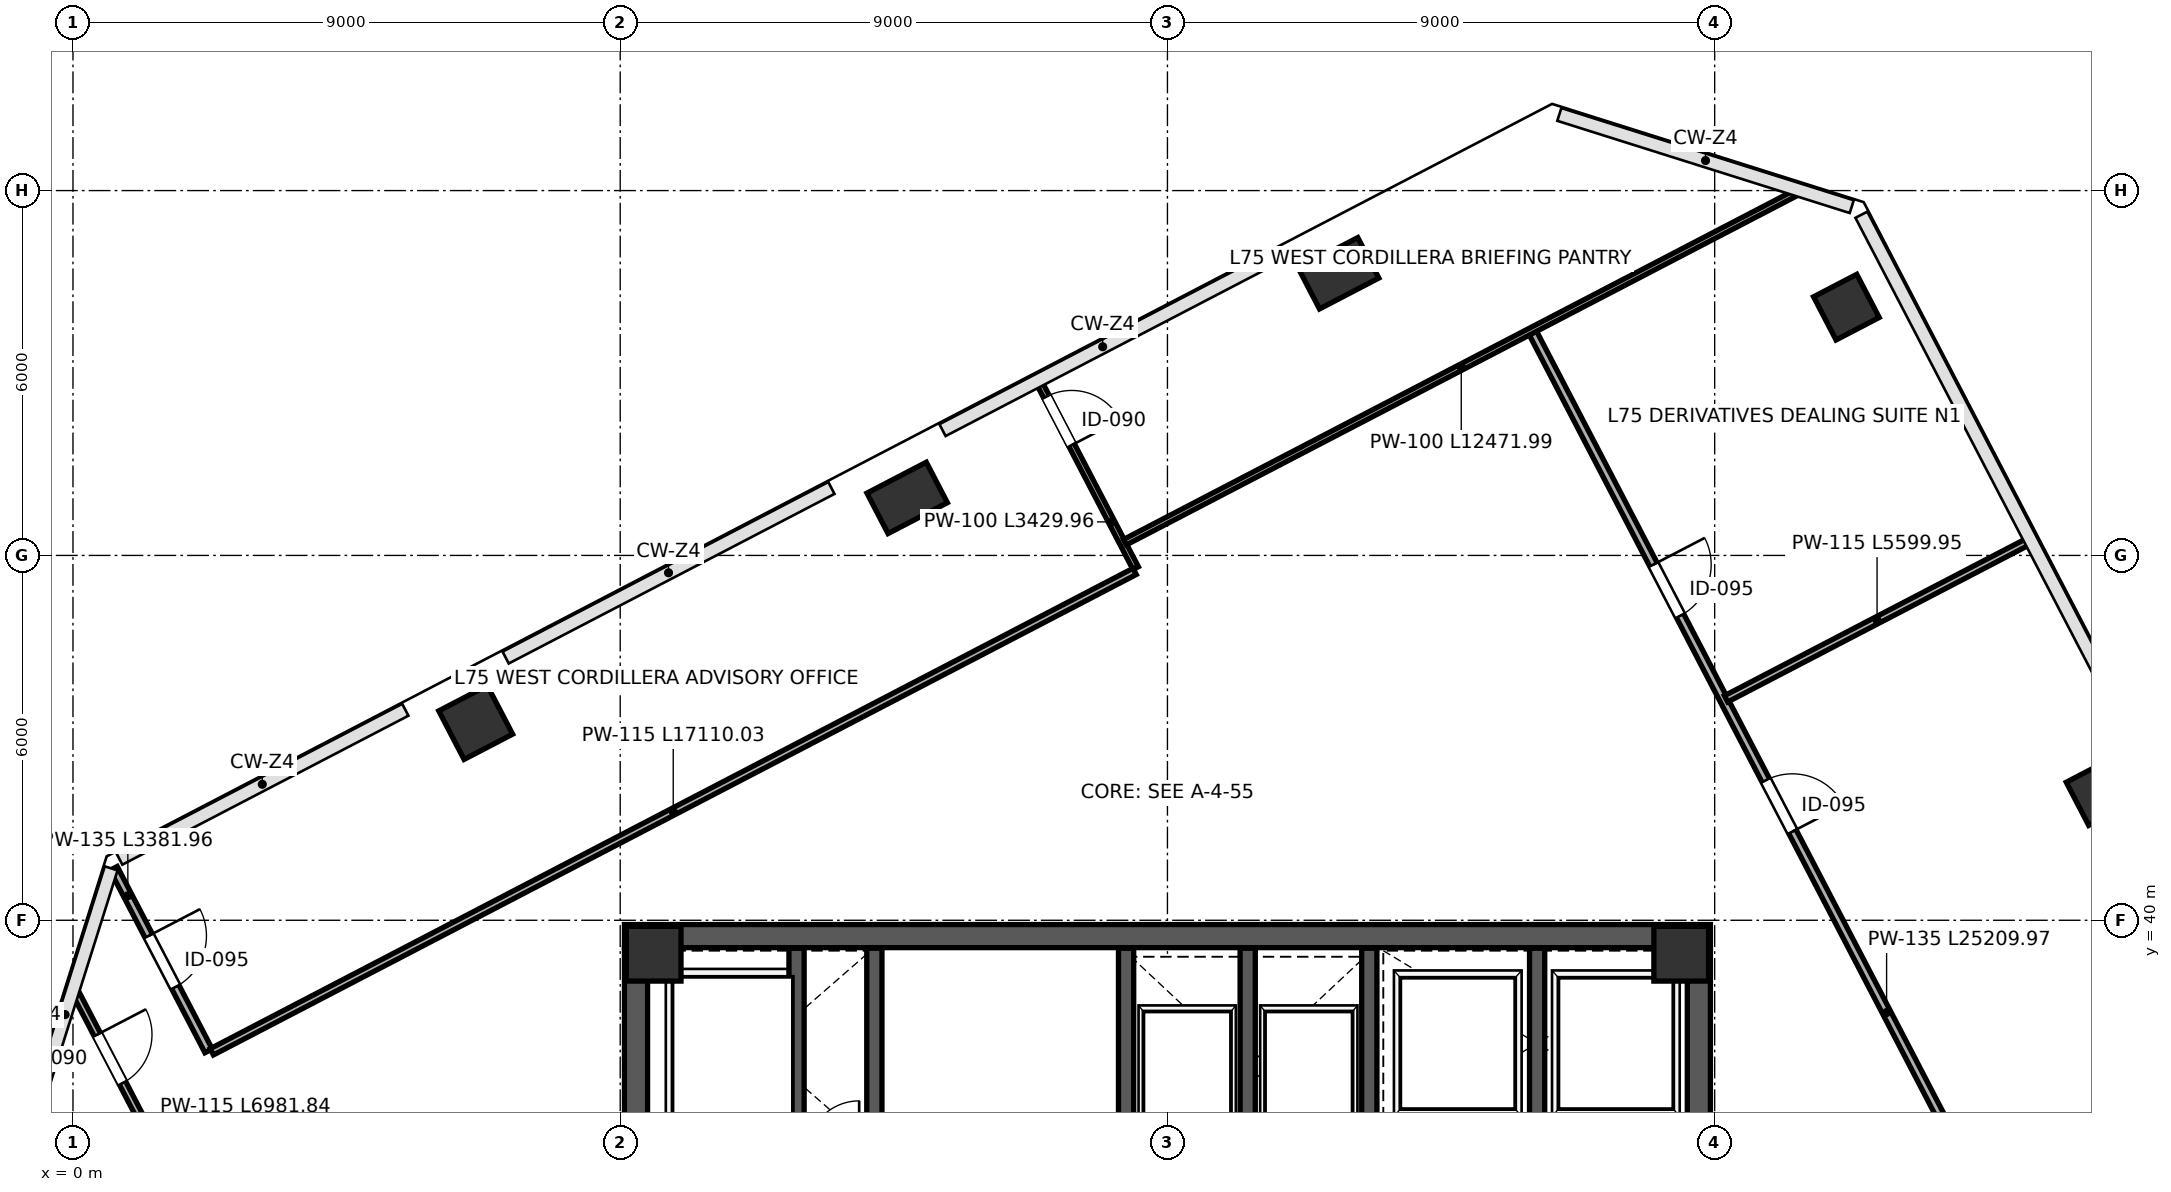
"""IFC4 building model, lengths in metres.
Left out: names, types, materials, properties, quantities, classifications, styles, units other than length and angle.
Written with IfcOpenShell. Run it as: python <this file> out.ifc"""

import sys

from ifc_helpers import new_model, si_unit, direction, frame, frame_2d, origin, origin_2d, place, context, subcontext, project, spatial, rectangle, extrude, source, transform, mapped, element, fill, save


model = new_model("IFC4")
c1 = context("Model", 3, precision=1e-05, world=origin(), true_north=direction((0.0, 1.0)))
c2 = subcontext(c1, "Body", "Model", "MODEL_VIEW")
j1 = project(units=[si_unit("LENGTHUNIT", "METRE"), si_unit("PLANEANGLEUNIT", "RADIAN")], contexts=[c1])
p1 = place(None, origin())
s1 = spatial("IfcSite", under=j1, at=p1, CompositionType="ELEMENT")
p2 = place(p1, origin())
s2 = spatial("IfcBuilding", under=s1, at=p2, CompositionType="ELEMENT")
p3 = place(p2, frame((0.0, 0.0, 332.4)))
s3 = spatial("IfcBuildingStorey", under=s2, at=p3, CompositionType="ELEMENT", Elevation=332.4)
m1 = source(origin(), c2, "Body", "SweptSolid", [
    extrude(rectangle(XDim=0.9, YDim=0.9, at=origin_2d()), origin(), (0.0, 0.0, 1.0), 4.199),
])
for number, where, z_axis, x_axis in (
    (1, (9.55, 39.45, 0.001), (0.0, 0.0, 1.0), (1.0, 0.0, 0.0)),
    (2, (26.45, 39.45, 0.001), (0.0, 0.0, 1.0), (1.0, 0.0, 0.0)),
):
    element("IfcColumn", number, at=place(p3, frame(where, z_axis=z_axis, x_axis=x_axis)), inside=s3, PredefinedType="COLUMN", context=c2, shape_type="MappedRepresentation", body=[
        mapped(m1, transform((0.0, 0.0, 0.0), scale=1.0)),
    ])
m2 = source(origin(), c2, "Body", "SweptSolid", [
    extrude(rectangle(XDim=0.8, YDim=0.8, at=origin_2d()), origin(), (0.0, 0.0, 1.0), 4.199),
])
for number, where, z_axis, x_axis in (
    (3, (29.167, 50.083, 0.001), (0.0, 0.0, 1.0), (-0.462, 0.887, 0.0)),
    (4, (33.322, 42.1, 0.001), (0.0, 0.0, 1.0), (-0.462, 0.887, 0.0)),
):
    element("IfcColumn", number, at=place(p3, frame(where, z_axis=z_axis, x_axis=x_axis)), inside=s3, PredefinedType="COLUMN", context=c2, shape_type="MappedRepresentation", body=[
        mapped(m2, transform((0.0, 0.0, 0.0), scale=1.0)),
    ])
m3 = source(origin(), c2, "Body", "SweptSolid", [
    extrude(rectangle(XDim=0.9, YDim=0.9, at=origin_2d()), origin(), (0.0, 0.0, 1.0), 4.199),
])
p4 = place(p3, frame((6.623, 43.252, 0.001), z_axis=(0.0, 0.0, 1.0), x_axis=(-0.461748613235, 0.887010833178, 0.0)))
e5 = element("IfcColumn", 5, at=p4, inside=s3, PredefinedType="COLUMN", context=c2, shape_type="MappedRepresentation", body=[
    mapped(m3, transform((0.0, 0.0, 0.0), scale=1.0)),
])
m4 = source(origin(), c2, "Body", "SweptSolid", [
    extrude(rectangle(XDim=0.75, YDim=1.1, at=origin_2d()), origin(), (0.0, 0.0, 1.0), 4.199),
])
for number, where, z_axis, x_axis in (
    (6, (13.719, 46.946, 0.001), (0.0, 0.0, 1.0), (-0.462, 0.887, 0.0)),
    (7, (20.816, 50.64, 0.001), (0.0, 0.0, 1.0), (-0.462, 0.887, 0.0)),
):
    element("IfcColumn", number, at=place(p3, frame(where, z_axis=z_axis, x_axis=x_axis)), inside=s3, PredefinedType="PILASTER", context=c2, shape_type="MappedRepresentation", body=[
        mapped(m4, transform((0.0, 0.0, 0.0), scale=1.0)),
    ])
p5 = place(p3, frame((9.26, 24.45, 0.0), z_axis=(0.0, 0.0, 1.0), x_axis=(0.0, 1.0, 0.0)))
e8 = element("IfcWall", 8, at=p5, inside=s3, PredefinedType="SHEAR", context=c2, shape_type="SweptSolid", body=[
    extrude(rectangle(XDim=15.1, YDim=0.38, at=frame_2d((7.55, 0.0))), origin(), (0.0, 0.0, 1.0), 3.96),
])
p6 = place(p5, frame((8.7, 0.0, 0.0)))
e9 = element("IfcOpeningElement", 9, at=p6, cuts=e8, PredefinedType="OPENING", context=c2, shape_type="SweptSolid", body=[
    extrude(rectangle(XDim=1.15, YDim=2.2, at=frame_2d((0.575, 1.1))), frame((0.0, 0.2, 0.0), z_axis=(0.0, -1.0, 0.0), x_axis=(1.0, 0.0, 0.0)), (0.0, 0.0, 1.0), 0.4),
])
p7 = place(p3, frame((26.74, 24.45, 0.0), z_axis=(0.0, 0.0, 1.0), x_axis=(0.0, 1.0, 0.0)))
e10 = element("IfcWall", 10, at=p7, inside=s3, PredefinedType="SHEAR", context=c2, shape_type="SweptSolid", body=[
    extrude(rectangle(XDim=15.1, YDim=0.38, at=frame_2d((7.55, 0.0))), origin(), (0.0, 0.0, 1.0), 3.96),
])
p8 = place(p7, frame((8.6, 0.0, 0.0)))
e11 = element("IfcOpeningElement", 11, at=p8, cuts=e10, PredefinedType="OPENING", context=c2, shape_type="SweptSolid", body=[
    extrude(rectangle(XDim=1.15, YDim=2.2, at=frame_2d((0.575, 1.1))), frame((0.0, 0.2, 0.0), z_axis=(0.0, -1.0, 0.0), x_axis=(1.0, 0.0, 0.0)), (0.0, 0.0, 1.0), 0.4),
])
p9 = place(p3, frame((9.07, 39.74, 0.0), z_axis=(0.0, 0.0, 1.0), x_axis=(1.0, 0.0, 0.0)))
e12 = element("IfcWall", 12, at=p9, inside=s3, PredefinedType="SHEAR", context=c2, shape_type="SweptSolid", body=[
    extrude(rectangle(XDim=17.86, YDim=0.38, at=frame_2d((8.93, 0.0))), origin(), (0.0, 0.0, 1.0), 3.96),
])
p10 = place(p3, frame((21.32, 32.12, 0.0), z_axis=(0.0, 0.0, 1.0), x_axis=(0.0, 1.0, 0.0)))
e13 = element("IfcWall", 13, at=p10, inside=s3, PredefinedType="SHEAR", context=c2, shape_type="SweptSolid", body=[
    extrude(rectangle(XDim=7.42, YDim=0.25, at=frame_2d((3.71, 0.0))), origin(), (0.0, 0.0, 1.0), 3.96),
])
p11 = place(p10, frame((1.4, 0.0, 0.0)))
e14 = element("IfcOpeningElement", 14, at=p11, cuts=e13, PredefinedType="OPENING", context=c2, shape_type="SweptSolid", body=[
    extrude(rectangle(XDim=1.15, YDim=2.2, at=frame_2d((0.575, 1.1))), frame((0.0, 0.135, 0.0), z_axis=(0.0, -1.0, 0.0), x_axis=(1.0, 0.0, 0.0)), (0.0, 0.0, 1.0), 0.27),
])
p12 = place(p3, frame((11.9, 36.31, 0.0), z_axis=(0.0, 0.0, 1.0), x_axis=(0.0, 1.0, 0.0)))
e15 = element("IfcWall", 15, at=p12, inside=s3, PredefinedType="SHEAR", context=c2, shape_type="SweptSolid", body=[
    extrude(rectangle(XDim=3.23, YDim=0.25, at=frame_2d((1.615, 0.0))), origin(), (0.0, 0.0, 1.0), 3.96),
])
p13 = place(p3, frame((24.08, 36.48, 0.0), z_axis=(0.0, 0.0, 1.0), x_axis=(0.0, 1.0, 0.0)))
e16 = element("IfcWall", 16, at=p13, inside=s3, PredefinedType="SHEAR", context=c2, shape_type="SweptSolid", body=[
    extrude(rectangle(XDim=3.06, YDim=0.25, at=frame_2d((1.53, 0.0))), origin(), (0.0, 0.0, 1.0), 3.96),
])
p14 = place(p3, frame((13.18, 36.2, 0.0), z_axis=(0.0, 0.0, 1.0), x_axis=(0.0, 1.0, 0.0)))
e17 = element("IfcWall", 17, at=p14, inside=s3, PredefinedType="SHEAR", context=c2, shape_type="SweptSolid", body=[
    extrude(rectangle(XDim=3.34, YDim=0.25, at=frame_2d((1.67, 0.0))), origin(), (0.0, 0.0, 1.0), 3.96),
])
for number, where, z_axis, x_axis in (
    (18, (17.32, 35.81, 0.0), (0.0, 0.0, 1.0), (0.0, 1.0, 0.0)),
    (19, (19.32, 35.81, 0.0), (0.0, 0.0, 1.0), (0.0, 1.0, 0.0)),
):
    element("IfcWall", number, at=place(p3, frame(where, z_axis=z_axis, x_axis=x_axis)), inside=s3, PredefinedType="SHEAR", context=c2, shape_type="SweptSolid", body=[
        extrude(rectangle(XDim=3.73, YDim=0.25, at=frame_2d((1.865, 0.0))), origin(), (0.0, 0.0, 1.0), 3.96),
    ])
p15 = place(p3, frame((0.031, 38.83, 0.0), z_axis=(0.0, 0.0, 1.0), x_axis=(0.461729249278, -0.887020913147, 0.0)))
e20 = element("IfcWall", 20, at=p15, inside=s3, PredefinedType="PARTITIONING", context=c2, shape_type="SweptSolid", body=[
    extrude(rectangle(XDim=6.982, YDim=0.115, at=frame_2d((3.491, 0.0))), origin(), (0.0, 0.0, 1.0), 3.96),
])
p16 = place(p15, frame((0.8, 0.0, 0.0)))
e21 = element("IfcOpeningElement", 21, at=p16, cuts=e20, PredefinedType="OPENING", context=c2, shape_type="SweptSolid", body=[
    extrude(rectangle(XDim=0.9, YDim=2.15, at=frame_2d((0.45, 1.075))), frame((0.0, 0.067, 0.0), z_axis=(0.0, -1.0, 0.0), x_axis=(1.0, 0.0, 0.0)), (0.0, 0.0, 1.0), 0.135),
])
p17 = place(p15, frame((5.36, 0.0, 0.0)))
e22 = element("IfcOpeningElement", 22, at=p17, cuts=e20, PredefinedType="OPENING", context=c2, shape_type="SweptSolid", body=[
    extrude(rectangle(XDim=0.95, YDim=2.15, at=frame_2d((0.475, 1.075))), frame((0.0, 0.067, 0.0), z_axis=(0.0, -1.0, 0.0), x_axis=(1.0, 0.0, 0.0)), (0.0, 0.0, 1.0), 0.135),
])
p18 = place(p3, frame((24.007, 49.664, 0.0), z_axis=(0.0, 0.0, 1.0), x_axis=(0.461753963132, -0.887008048178, 0.0)))
e23 = element("IfcWall", 23, at=p18, inside=s3, PredefinedType="PARTITIONING", context=c2, shape_type="SweptSolid", body=[
    extrude(rectangle(XDim=25.21, YDim=0.135, at=frame_2d((12.605, 0.0))), origin(), (0.0, 0.0, 1.0), 3.96),
])
p19 = place(p18, frame((4.3, 0.0, 0.0)))
e24 = element("IfcOpeningElement", 24, at=p19, cuts=e23, PredefinedType="OPENING", context=c2, shape_type="SweptSolid", body=[
    extrude(rectangle(XDim=0.95, YDim=2.15, at=frame_2d((0.475, 1.075))), frame((0.0, 0.078, 0.0), z_axis=(0.0, -1.0, 0.0), x_axis=(1.0, 0.0, 0.0)), (0.0, 0.0, 1.0), 0.155),
])
p20 = place(p18, frame((8.3, 0.0, 0.0)))
e25 = element("IfcOpeningElement", 25, at=p20, cuts=e23, PredefinedType="OPENING", context=c2, shape_type="SweptSolid", body=[
    extrude(rectangle(XDim=0.95, YDim=2.15, at=frame_2d((0.475, 1.075))), frame((0.0, 0.078, 0.0), z_axis=(0.0, -1.0, 0.0), x_axis=(1.0, 0.0, 0.0)), (0.0, 0.0, 1.0), 0.155),
])
p21 = place(p3, frame((27.187, 43.641, 0.0), z_axis=(0.0, 0.0, 1.0), x_axis=(0.886991844597, 0.461785088129, 0.0)))
e26 = element("IfcWall", 26, at=p21, inside=s3, PredefinedType="PARTITIONING", context=c2, shape_type="SweptSolid", body=[
    extrude(rectangle(XDim=5.6, YDim=0.115, at=frame_2d((2.8, 0.0))), origin(), (0.0, 0.0, 1.0), 3.295),
])
p22 = place(p3, frame((15.894, 48.833, 0.0), z_axis=(0.0, 0.0, 1.0), x_axis=(0.461760597426, -0.8870045945, 0.0)))
e27 = element("IfcWall", 27, at=p22, inside=s3, PredefinedType="PARTITIONING", context=c2, shape_type="SweptSolid", body=[
    extrude(rectangle(XDim=3.43, YDim=0.1, at=frame_2d((1.715, 0.0))), origin(), (0.0, 0.0, 1.0), 3.295),
])
p23 = place(p22, frame((0.25, 0.0, 0.0)))
e28 = element("IfcOpeningElement", 28, at=p23, cuts=e27, PredefinedType="OPENING", context=c2, shape_type="SweptSolid", body=[
    extrude(rectangle(XDim=0.9, YDim=2.15, at=frame_2d((0.45, 1.075))), frame((0.0, 0.06, 0.0), z_axis=(0.0, -1.0, 0.0), x_axis=(1.0, 0.0, 0.0)), (0.0, 0.0, 1.0), 0.12),
])
p24 = place(p3, frame((0.668, 40.853, 0.0), z_axis=(0.0, 0.0, 1.0), x_axis=(0.461736835827, -0.887016964009, 0.0)))
e29 = element("IfcWall", 29, at=p24, inside=s3, PredefinedType="PARTITIONING", context=c2, shape_type="SweptSolid", body=[
    extrude(rectangle(XDim=3.382, YDim=0.135, at=frame_2d((1.691, 0.0))), origin(), (0.0, 0.0, 1.0), 3.96),
])
p25 = place(p24, frame((1.25, 0.0, 0.0)))
e30 = element("IfcOpeningElement", 30, at=p25, cuts=e29, PredefinedType="OPENING", context=c2, shape_type="SweptSolid", body=[
    extrude(rectangle(XDim=0.95, YDim=2.15, at=frame_2d((0.475, 1.075))), frame((0.0, 0.078, 0.0), z_axis=(0.0, -1.0, 0.0), x_axis=(1.0, 0.0, 0.0)), (0.0, 0.0, 1.0), 0.155),
])
p26 = place(p3, frame((2.284, 37.836, 0.0), z_axis=(0.0, 0.0, 1.0), x_axis=(0.887016973522, 0.461736817553, 0.0)))
e31 = element("IfcWall", 31, at=p26, inside=s3, PredefinedType="PARTITIONING", context=c2, shape_type="SweptSolid", body=[
    extrude(rectangle(XDim=17.11, YDim=0.115, at=frame_2d((8.555, 0.0))), origin(), (0.0, 0.0, 1.0), 3.96),
])
p27 = place(p3, frame((17.301, 46.217, 0.0), z_axis=(0.0, 0.0, 1.0), x_axis=(0.887006461695, 0.461757010679, 0.0)))
e32 = element("IfcWall", 32, at=p27, inside=s3, PredefinedType="PARTITIONING", context=c2, shape_type="SweptSolid", body=[
    extrude(rectangle(XDim=12.472, YDim=0.1, at=frame_2d((6.236, 0.0))), origin(), (0.0, 0.0, 1.0), 3.96),
])
m5 = source(origin(), c2, "Body", "SweptSolid", [
    extrude(rectangle(XDim=0.9, YDim=2.15, at=frame_2d((0.45, 1.075))), frame((0.0, 0.025, 0.0), z_axis=(0.0, -1.0, 0.0), x_axis=(1.0, 0.0, 0.0)), (0.0, 0.0, 1.0), 0.05),
])
p28 = place(p16, origin())
e33 = element("IfcDoor", 33, at=p28, inside=s3, OperationType="SINGLE_SWING_LEFT", PredefinedType="DOOR", context=c2, shape_type="MappedRepresentation", body=[
    mapped(m5, transform((0.0, 0.0, 0.0), scale=1.0)),
])
fill(e21, e33)
m6 = source(origin(), c2, "Body", "SweptSolid", [
    extrude(rectangle(XDim=0.95, YDim=2.15, at=frame_2d((0.475, 1.075))), frame((0.0, 0.025, 0.0), z_axis=(0.0, -1.0, 0.0), x_axis=(1.0, 0.0, 0.0)), (0.0, 0.0, 1.0), 0.05),
])
p29 = place(p19, origin())
e34 = element("IfcDoor", 34, at=p29, inside=s3, OperationType="SINGLE_SWING_LEFT", PredefinedType="DOOR", context=c2, shape_type="MappedRepresentation", body=[
    mapped(m6, transform((0.0, 0.0, 0.0), scale=1.0)),
])
fill(e24, e34)
p30 = place(p20, origin())
e35 = element("IfcDoor", 35, at=p30, inside=s3, OperationType="SINGLE_SWING_RIGHT", PredefinedType="DOOR", context=c2, shape_type="MappedRepresentation", body=[
    mapped(m6, transform((0.0, 0.0, 0.0), scale=1.0)),
])
fill(e25, e35)
p31 = place(p25, origin())
e36 = element("IfcDoor", 36, at=p31, inside=s3, OperationType="SINGLE_SWING_LEFT", PredefinedType="DOOR", context=c2, shape_type="MappedRepresentation", body=[
    mapped(m6, transform((0.0, 0.0, 0.0), scale=1.0)),
])
fill(e30, e36)
p32 = place(p23, origin())
e37 = element("IfcDoor", 37, at=p32, inside=s3, OperationType="SINGLE_SWING_RIGHT", PredefinedType="DOOR", context=c2, shape_type="MappedRepresentation", body=[
    mapped(m5, transform((0.0, 0.0, 0.0), scale=1.0)),
])
fill(e28, e37)
save(model, sys.argv[1])
